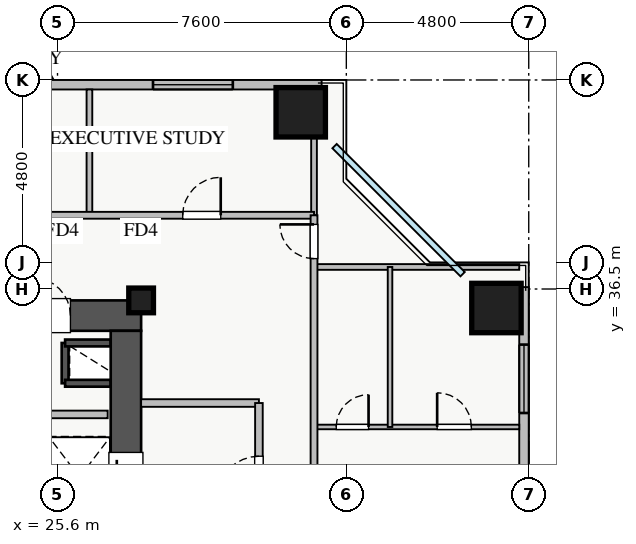
"""IFC4 building model, lengths in metres.
Left out: names, types, materials, properties, quantities, classifications, styles, units other than length and angle.
Written with IfcOpenShell. Run it as: python <this file> out.ifc"""

import sys

from ifc_helpers import new_model, si_unit, direction, frame, frame_2d, origin, origin_2d, place, context, subcontext, project, spatial, rectangle, extrude, source, transform, mapped, element, fill, save


model = new_model("IFC4")
c1 = context("Model", 3, precision=1e-05, world=origin(), true_north=direction((0.0, 1.0)))
c2 = subcontext(c1, "Body", "Model", "MODEL_VIEW")
j1 = project(units=[si_unit("LENGTHUNIT", "METRE"), si_unit("PLANEANGLEUNIT", "RADIAN")], contexts=[c1])
p1 = place(None, origin())
s1 = spatial("IfcSite", under=j1, at=p1, CompositionType="ELEMENT")
p2 = place(p1, origin())
s2 = spatial("IfcBuilding", under=s1, at=p2, CompositionType="ELEMENT")
p3 = place(p2, frame((0.0, 0.0, 42.5)))
s3 = spatial("IfcBuildingStorey", under=s2, at=p3, CompositionType="ELEMENT", Elevation=42.5)
p4 = place(p3, frame((25.8, 34.02, 0.0), z_axis=(0.0, 0.0, 1.0), x_axis=(0.0, 1.0, 0.0)))
e1 = element("IfcWall", 1, at=p4, inside=s3, PredefinedType="SHEAR", context=c2, shape_type="SweptSolid", body=[
    extrude(rectangle(XDim=1.06, YDim=0.18, at=frame_2d((0.53, 0.0))), origin(), (0.0, 0.0, 1.0), 3.03),
])
for number, where, z_axis, x_axis in (
    (2, (25.8, 35.08, 0.0), (0.0, 0.0, 1.0), (1.0, 0.0, 0.0)),
    (3, (25.8, 34.02, 0.0), (0.0, 0.0, 1.0), (1.0, 0.0, 0.0)),
):
    element("IfcWall", number, at=place(p3, frame(where, z_axis=z_axis, x_axis=x_axis)), inside=s3, PredefinedType="SHEAR", context=c2, shape_type="SweptSolid", body=[
        extrude(rectangle(XDim=1.2, YDim=0.18, at=frame_2d((0.6, 0.0))), origin(), (0.0, 0.0, 1.0), 3.03),
    ])
p5 = place(p3, frame((10.2, 35.8, 0.0), z_axis=(0.0, 0.0, 1.0), x_axis=(1.0, 0.0, 0.0)))
e4 = element("IfcWall", 4, at=p5, inside=s3, PredefinedType="SHEAR", context=c2, shape_type="SweptSolid", body=[
    extrude(rectangle(XDim=17.6, YDim=0.8, at=frame_2d((8.8, 0.0))), origin(), (0.0, 0.0, 1.0), 3.25),
])
p6 = place(p5, frame((1.15, 0.0, 0.0)))
e5 = element("IfcOpeningElement", 5, at=p6, cuts=e4, PredefinedType="OPENING", context=c2, shape_type="SweptSolid", body=[
    extrude(rectangle(XDim=1.1, YDim=2.05, at=frame_2d((0.55, 1.025))), frame((0.0, 0.41, 0.0), z_axis=(0.0, -1.0, 0.0), x_axis=(1.0, 0.0, 0.0)), (0.0, 0.0, 1.0), 0.82),
])
p7 = place(p5, frame((8.3, 0.0, 0.0)))
e6 = element("IfcOpeningElement", 6, at=p7, cuts=e4, PredefinedType="OPENING", context=c2, shape_type="SweptSolid", body=[
    extrude(rectangle(XDim=1.1, YDim=2.05, at=frame_2d((0.55, 1.025))), frame((0.0, 0.41, 0.0), z_axis=(0.0, -1.0, 0.0), x_axis=(1.0, 0.0, 0.0)), (0.0, 0.0, 1.0), 0.82),
])
p8 = place(p5, frame((10.05, 0.0, 0.0)))
e7 = element("IfcOpeningElement", 7, at=p8, cuts=e4, PredefinedType="OPENING", context=c2, shape_type="SweptSolid", body=[
    extrude(rectangle(XDim=1.1, YDim=2.05, at=frame_2d((0.55, 1.025))), frame((0.0, 0.41, 0.0), z_axis=(0.0, -1.0, 0.0), x_axis=(1.0, 0.0, 0.0)), (0.0, 0.0, 1.0), 0.82),
])
p9 = place(p5, frame((14.74, 0.0, 0.0)))
e8 = element("IfcOpeningElement", 8, at=p9, cuts=e4, PredefinedType="OPENING", context=c2, shape_type="SweptSolid", body=[
    extrude(rectangle(XDim=1.0, YDim=2.05, at=frame_2d((0.5, 1.025))), frame((0.0, 0.41, 0.0), z_axis=(0.0, -1.0, 0.0), x_axis=(1.0, 0.0, 0.0)), (0.0, 0.0, 1.0), 0.82),
])
p10 = place(p5, frame((11.95, 0.0, 0.0)))
e9 = element("IfcOpeningElement", 9, at=p10, cuts=e4, PredefinedType="OPENING", context=c2, shape_type="SweptSolid", body=[
    extrude(rectangle(XDim=1.0, YDim=2.05, at=frame_2d((0.5, 1.025))), frame((0.0, 0.41, 0.0), z_axis=(0.0, -1.0, 0.0), x_axis=(1.0, 0.0, 0.0)), (0.0, 0.0, 1.0), 0.82),
])
p11 = place(p5, frame((13.485, 0.0, 0.0)))
e10 = element("IfcOpeningElement", 10, at=p11, cuts=e4, PredefinedType="OPENING", context=c2, shape_type="SweptSolid", body=[
    extrude(rectangle(XDim=1.0, YDim=2.05, at=frame_2d((0.5, 1.025))), frame((0.0, 0.41, 0.0), z_axis=(0.0, -1.0, 0.0), x_axis=(1.0, 0.0, 0.0)), (0.0, 0.0, 1.0), 0.82),
])
p12 = place(p3, frame((27.4, 29.8, 0.0), z_axis=(0.0, 0.0, 1.0), x_axis=(0.0, 1.0, 0.0)))
e11 = element("IfcWall", 11, at=p12, inside=s3, PredefinedType="SHEAR", context=c2, shape_type="SweptSolid", body=[
    extrude(rectangle(XDim=5.6, YDim=0.8, at=frame_2d((2.8, 0.0))), origin(), (0.0, 0.0, 1.0), 3.25),
])
p13 = place(p12, frame((1.1, 0.0, 0.0)))
e12 = element("IfcOpeningElement", 12, at=p13, cuts=e11, PredefinedType="OPENING", context=c2, shape_type="SweptSolid", body=[
    extrude(rectangle(XDim=1.3, YDim=2.05, at=frame_2d((0.65, 1.025))), frame((0.0, 0.41, 0.0), z_axis=(0.0, -1.0, 0.0), x_axis=(1.0, 0.0, 0.0)), (0.0, 0.0, 1.0), 0.82),
])
m1 = source(origin(), c2, "Body", "SweptSolid", [
    extrude(rectangle(XDim=0.65, YDim=0.65, at=origin_2d()), origin(), (0.0, 0.0, 1.0), 3.25),
])
p14 = place(p3, frame((27.8, 36.2, 0.0), z_axis=(0.0, 0.0, 1.0), x_axis=(1.0, 0.0, 0.0)))
e13 = element("IfcColumn", 13, at=p14, inside=s3, PredefinedType="PILASTER", context=c2, shape_type="MappedRepresentation", body=[
    mapped(m1, transform((0.0, 0.0, 0.0), x_axis=(1.0, 0.0, 0.0), y_axis=(0.0, 1.0, 0.0), z_axis=(0.0, 0.0, 1.0), scale=1.0)),
])
m2 = source(origin(), c2, "Body", "SweptSolid", [
    extrude(rectangle(XDim=1.3, YDim=1.3, at=origin_2d()), origin(), (0.0, 0.0, 1.0), 3.25),
])
for number, where, z_axis, x_axis in (
    (14, (37.15, 36.0, 0.0), (0.0, 0.0, 1.0), (1.0, 0.0, 0.0)),
    (15, (32.0, 41.15, 0.0), (0.0, 0.0, 1.0), (1.0, 0.0, 0.0)),
):
    element("IfcColumn", number, at=place(p3, frame(where, z_axis=z_axis, x_axis=x_axis)), inside=s3, PredefinedType="COLUMN", context=c2, shape_type="MappedRepresentation", body=[
        mapped(m2, transform((0.0, 0.0, 0.0), x_axis=(1.0, 0.0, 0.0), y_axis=(0.0, 1.0, 0.0), z_axis=(0.0, 0.0, 1.0), scale=1.0)),
    ])
p15 = place(p3, frame((5.45, 41.875, 0.0), z_axis=(0.0, 0.0, 1.0), x_axis=(1.0, 0.0, 0.0)))
e16 = element("IfcWall", 16, at=p15, inside=s3, PredefinedType="STANDARD", context=c2, shape_type="SweptSolid", body=[
    extrude(rectangle(XDim=27.1, YDim=0.25, at=frame_2d((13.55, 0.0))), origin(), (0.0, 0.0, 1.0), 2.57),
])
p16 = place(p15, frame((14.4, 0.0, 0.0)))
e17 = element("IfcOpeningElement", 17, at=p16, cuts=e16, PredefinedType="OPENING", context=c2, shape_type="SweptSolid", body=[
    extrude(rectangle(XDim=1.2, YDim=2.1, at=frame_2d((0.6, 1.05))), frame((0.0, 0.135, 0.0), z_axis=(0.0, -1.0, 0.0), x_axis=(1.0, 0.0, 0.0)), (0.0, 0.0, 1.0), 0.27),
])
p17 = place(p15, frame((1.45, 0.0, 0.9)))
e18 = element("IfcOpeningElement", 18, at=p17, cuts=e16, PredefinedType="OPENING", context=c2, shape_type="SweptSolid", body=[
    extrude(rectangle(XDim=1.5, YDim=1.5, at=frame_2d((0.75, 0.75))), frame((0.0, 0.135, 0.0), z_axis=(0.0, -1.0, 0.0), x_axis=(1.0, 0.0, 0.0)), (0.0, 0.0, 1.0), 0.27),
])
p18 = place(p15, frame((7.82, 0.0, 0.9)))
e19 = element("IfcOpeningElement", 19, at=p18, cuts=e16, PredefinedType="OPENING", context=c2, shape_type="SweptSolid", body=[
    extrude(rectangle(XDim=1.8, YDim=1.5, at=frame_2d((0.9, 0.75))), frame((0.0, 0.135, 0.0), z_axis=(0.0, -1.0, 0.0), x_axis=(1.0, 0.0, 0.0)), (0.0, 0.0, 1.0), 0.27),
])
p19 = place(p15, frame((17.92, 0.0, 0.9)))
e20 = element("IfcOpeningElement", 20, at=p19, cuts=e16, PredefinedType="OPENING", context=c2, shape_type="SweptSolid", body=[
    extrude(rectangle(XDim=1.5, YDim=1.5, at=frame_2d((0.75, 0.75))), frame((0.0, 0.135, 0.0), z_axis=(0.0, -1.0, 0.0), x_axis=(1.0, 0.0, 0.0)), (0.0, 0.0, 1.0), 0.27),
])
p20 = place(p15, frame((22.663, 0.0, 0.9)))
e21 = element("IfcOpeningElement", 21, at=p20, cuts=e16, PredefinedType="OPENING", context=c2, shape_type="SweptSolid", body=[
    extrude(rectangle(XDim=2.1, YDim=1.48, at=frame_2d((1.05, 0.74))), frame((0.0, 0.135, 0.0), z_axis=(0.0, -1.0, 0.0), x_axis=(1.0, 0.0, 0.0)), (0.0, 0.0, 1.0), 0.27),
])
p21 = place(p15, frame((5.084, 0.0, 0.9)))
e22 = element("IfcOpeningElement", 22, at=p21, cuts=e16, PredefinedType="OPENING", context=c2, shape_type="SweptSolid", body=[
    extrude(rectangle(XDim=2.4, YDim=1.5, at=frame_2d((1.2, 0.75))), frame((0.0, 0.135, 0.0), z_axis=(0.0, -1.0, 0.0), x_axis=(1.0, 0.0, 0.0)), (0.0, 0.0, 1.0), 0.27),
])
p22 = place(p15, frame((11.002, 0.0, 0.9)))
e23 = element("IfcOpeningElement", 23, at=p22, cuts=e16, PredefinedType="OPENING", context=c2, shape_type="SweptSolid", body=[
    extrude(rectangle(XDim=2.4, YDim=1.5, at=frame_2d((1.2, 0.75))), frame((0.0, 0.135, 0.0), z_axis=(0.0, -1.0, 0.0), x_axis=(1.0, 0.0, 0.0)), (0.0, 0.0, 1.0), 0.27),
])
p23 = place(p3, frame((37.875, 9.45, 0.0), z_axis=(0.0, 0.0, 1.0), x_axis=(0.0, 1.0, 0.0)))
e24 = element("IfcWall", 24, at=p23, inside=s3, PredefinedType="STANDARD", context=c2, shape_type="SweptSolid", body=[
    extrude(rectangle(XDim=27.1, YDim=0.25, at=frame_2d((13.55, 0.0))), origin(), (0.0, 0.0, 1.0), 2.57),
])
p24 = place(p23, frame((14.4, 0.0, 0.0)))
e25 = element("IfcOpeningElement", 25, at=p24, cuts=e24, PredefinedType="OPENING", context=c2, shape_type="SweptSolid", body=[
    extrude(rectangle(XDim=1.2, YDim=2.1, at=frame_2d((0.6, 1.05))), frame((0.0, 0.135, 0.0), z_axis=(0.0, -1.0, 0.0), x_axis=(1.0, 0.0, 0.0)), (0.0, 0.0, 1.0), 0.27),
])
p25 = place(p23, frame((2.188, 0.0, 0.9)))
e26 = element("IfcOpeningElement", 26, at=p25, cuts=e24, PredefinedType="OPENING", context=c2, shape_type="SweptSolid", body=[
    extrude(rectangle(XDim=2.4, YDim=1.48, at=frame_2d((1.2, 0.74))), frame((0.0, 0.135, 0.0), z_axis=(0.0, -1.0, 0.0), x_axis=(1.0, 0.0, 0.0)), (0.0, 0.0, 1.0), 0.27),
])
p26 = place(p23, frame((23.788, 0.0, 0.9)))
e27 = element("IfcOpeningElement", 27, at=p26, cuts=e24, PredefinedType="OPENING", context=c2, shape_type="SweptSolid", body=[
    extrude(rectangle(XDim=1.8, YDim=1.5, at=frame_2d((0.9, 0.75))), frame((0.0, 0.135, 0.0), z_axis=(0.0, -1.0, 0.0), x_axis=(1.0, 0.0, 0.0)), (0.0, 0.0, 1.0), 0.27),
])
p27 = place(p23, frame((19.758, 0.0, 0.9)))
e28 = element("IfcOpeningElement", 28, at=p27, cuts=e24, PredefinedType="OPENING", context=c2, shape_type="SweptSolid", body=[
    extrude(rectangle(XDim=2.4, YDim=1.5, at=frame_2d((1.2, 0.75))), frame((0.0, 0.135, 0.0), z_axis=(0.0, -1.0, 0.0), x_axis=(1.0, 0.0, 0.0)), (0.0, 0.0, 1.0), 0.27),
])
p28 = place(p23, frame((11.365, 0.0, 0.9)))
e29 = element("IfcOpeningElement", 29, at=p28, cuts=e24, PredefinedType="OPENING", context=c2, shape_type="SweptSolid", body=[
    extrude(rectangle(XDim=0.9, YDim=1.2, at=frame_2d((0.45, 0.6))), frame((0.0, 0.135, 0.0), z_axis=(0.0, -1.0, 0.0), x_axis=(1.0, 0.0, 0.0)), (0.0, 0.0, 1.0), 0.27),
])
p29 = place(p3, frame((27.8, 33.5, 0.0), z_axis=(0.0, 0.0, 1.0), x_axis=(1.0, 0.0, 0.0)))
e30 = element("IfcWall", 30, at=p29, inside=s3, PredefinedType="PARTITIONING", context=c2, shape_type="SweptSolid", body=[
    extrude(rectangle(XDim=3.1, YDim=0.2, at=frame_2d((1.55, 0.0))), origin(), (0.0, 0.0, 1.0), 3.03),
])
p30 = place(p3, frame((30.9, 29.6, 0.0), z_axis=(0.0, 0.0, 1.0), x_axis=(0.0, 1.0, 0.0)))
e31 = element("IfcWall", 31, at=p30, inside=s3, PredefinedType="PARTITIONING", context=c2, shape_type="SweptSolid", body=[
    extrude(rectangle(XDim=3.9, YDim=0.2, at=frame_2d((1.95, 0.0))), origin(), (0.0, 0.0, 1.0), 3.03),
])
p31 = place(p30, frame((1.4, 0.0, 0.0)))
e32 = element("IfcOpeningElement", 32, at=p31, cuts=e31, PredefinedType="OPENING", context=c2, shape_type="SweptSolid", body=[
    extrude(rectangle(XDim=1.1, YDim=2.05, at=frame_2d((0.55, 1.025))), frame((0.0, 0.11, 0.0), z_axis=(0.0, -1.0, 0.0), x_axis=(1.0, 0.0, 0.0)), (0.0, 0.0, 1.0), 0.22),
])
p32 = place(p3, frame((21.75, 33.2, 0.0), z_axis=(0.0, 0.0, 1.0), x_axis=(1.0, 0.0, 0.0)))
e33 = element("IfcWall", 33, at=p32, inside=s3, PredefinedType="PARTITIONING", context=c2, shape_type="SweptSolid", body=[
    extrude(rectangle(XDim=5.17, YDim=0.2, at=frame_2d((2.585, 0.0))), origin(), (0.0, 0.0, 1.0), 3.03),
])
for number, where, z_axis, x_axis in (
    (34, (26.44, 38.44, 0.0), (0.0, 0.0, 1.0), (0.0, 1.0, 0.0)),
    (35, (32.35, 38.44, 0.0), (0.0, 0.0, 1.0), (0.0, 1.0, 0.0)),
):
    element("IfcWall", number, at=place(p3, frame(where, z_axis=z_axis, x_axis=x_axis)), inside=s3, PredefinedType="PARTITIONING", context=c2, shape_type="SweptSolid", body=[
        extrude(rectangle(XDim=3.31, YDim=0.15, at=frame_2d((1.655, 0.0))), origin(), (0.0, 0.0, 1.0), 3.03),
    ])
p33 = place(p3, frame((8.72, 38.44, 0.0), z_axis=(0.0, 0.0, 1.0), x_axis=(1.0, 0.0, 0.0)))
e36 = element("IfcWall", 36, at=p33, inside=s3, PredefinedType="PARTITIONING", context=c2, shape_type="SweptSolid", body=[
    extrude(rectangle(XDim=23.63, YDim=0.18, at=frame_2d((11.815, 0.0))), origin(), (0.0, 0.0, 1.0), 3.03),
])
p34 = place(p33, frame((2.86, 0.0, 0.0)))
e37 = element("IfcOpeningElement", 37, at=p34, cuts=e36, PredefinedType="OPENING", context=c2, shape_type="SweptSolid", body=[
    extrude(rectangle(XDim=1.0, YDim=2.05, at=frame_2d((0.5, 1.025))), frame((0.0, 0.1, 0.0), z_axis=(0.0, -1.0, 0.0), x_axis=(1.0, 0.0, 0.0)), (0.0, 0.0, 1.0), 0.2),
])
p35 = place(p33, frame((9.4, 0.0, 0.0)))
e38 = element("IfcOpeningElement", 38, at=p35, cuts=e36, PredefinedType="OPENING", context=c2, shape_type="SweptSolid", body=[
    extrude(rectangle(XDim=1.0, YDim=2.05, at=frame_2d((0.5, 1.025))), frame((0.0, 0.1, 0.0), z_axis=(0.0, -1.0, 0.0), x_axis=(1.0, 0.0, 0.0)), (0.0, 0.0, 1.0), 0.2),
])
p36 = place(p33, frame((14.9, 0.0, 0.0)))
e39 = element("IfcOpeningElement", 39, at=p36, cuts=e36, PredefinedType="OPENING", context=c2, shape_type="SweptSolid", body=[
    extrude(rectangle(XDim=1.0, YDim=2.05, at=frame_2d((0.5, 1.025))), frame((0.0, 0.1, 0.0), z_axis=(0.0, -1.0, 0.0), x_axis=(1.0, 0.0, 0.0)), (0.0, 0.0, 1.0), 0.2),
])
p37 = place(p33, frame((20.175, 0.0, 0.0)))
e40 = element("IfcOpeningElement", 40, at=p37, cuts=e36, PredefinedType="OPENING", context=c2, shape_type="SweptSolid", body=[
    extrude(rectangle(XDim=1.0, YDim=2.05, at=frame_2d((0.5, 1.025))), frame((0.0, 0.1, 0.0), z_axis=(0.0, -1.0, 0.0), x_axis=(1.0, 0.0, 0.0)), (0.0, 0.0, 1.0), 0.2),
])
p38 = place(p3, frame((32.35, 37.08, 0.0), z_axis=(0.0, 0.0, 1.0), x_axis=(1.0, 0.0, 0.0)))
e41 = element("IfcWall", 41, at=p38, inside=s3, PredefinedType="PARTITIONING", context=c2, shape_type="SweptSolid", body=[
    extrude(rectangle(XDim=5.4, YDim=0.15, at=frame_2d((2.7, 0.0))), origin(), (0.0, 0.0, 1.0), 3.03),
])
p39 = place(p3, frame((32.35, 32.87, 0.0), z_axis=(0.0, 0.0, 1.0), x_axis=(1.0, 0.0, 0.0)))
e42 = element("IfcWall", 42, at=p39, inside=s3, PredefinedType="PLUMBINGWALL", context=c2, shape_type="SweptSolid", body=[
    extrude(rectangle(XDim=5.4, YDim=0.12, at=frame_2d((2.7, 0.0))), origin(), (0.0, 0.0, 1.0), 3.03),
])
p40 = place(p39, frame((0.585, 0.0, 0.0)))
e43 = element("IfcOpeningElement", 43, at=p40, cuts=e42, PredefinedType="OPENING", context=c2, shape_type="SweptSolid", body=[
    extrude(rectangle(XDim=0.85, YDim=2.05, at=frame_2d((0.425, 1.025))), frame((0.0, 0.07, 0.0), z_axis=(0.0, -1.0, 0.0), x_axis=(1.0, 0.0, 0.0)), (0.0, 0.0, 1.0), 0.14),
])
p41 = place(p39, frame((3.24, 0.0, 0.0)))
e44 = element("IfcOpeningElement", 44, at=p41, cuts=e42, PredefinedType="OPENING", context=c2, shape_type="SweptSolid", body=[
    extrude(rectangle(XDim=0.9, YDim=2.05, at=frame_2d((0.45, 1.025))), frame((0.0, 0.07, 0.0), z_axis=(0.0, -1.0, 0.0), x_axis=(1.0, 0.0, 0.0)), (0.0, 0.0, 1.0), 0.14),
])
p42 = place(p3, frame((34.35, 32.87, 0.0), z_axis=(0.0, 0.0, 1.0), x_axis=(0.0, 1.0, 0.0)))
e45 = element("IfcWall", 45, at=p42, inside=s3, PredefinedType="PLUMBINGWALL", context=c2, shape_type="SweptSolid", body=[
    extrude(rectangle(XDim=4.21, YDim=0.12, at=frame_2d((2.105, 0.0))), origin(), (0.0, 0.0, 1.0), 3.03),
])
p43 = place(p3, frame((32.35, 7.21, 0.0), z_axis=(0.0, 0.0, 1.0), x_axis=(0.0, 1.0, 0.0)))
e46 = element("IfcWall", 46, at=p43, inside=s3, PredefinedType="PARTITIONING", context=c2, shape_type="SweptSolid", body=[
    extrude(rectangle(XDim=31.23, YDim=0.18, at=frame_2d((15.615, 0.0))), origin(), (0.0, 0.0, 1.0), 2.825),
])
p44 = place(p43, frame((30.09, 0.0, 0.0)))
e47 = element("IfcOpeningElement", 47, at=p44, cuts=e46, PredefinedType="OPENING", context=c2, shape_type="SweptSolid", body=[
    extrude(rectangle(XDim=0.9, YDim=2.05, at=frame_2d((0.45, 1.025))), frame((0.0, 0.1, 0.0), z_axis=(0.0, -1.0, 0.0), x_axis=(1.0, 0.0, 0.0)), (0.0, 0.0, 1.0), 0.2),
])
p45 = place(p43, frame((0.415, 0.0, 0.0)))
e48 = element("IfcOpeningElement", 48, at=p45, cuts=e46, PredefinedType="OPENING", context=c2, shape_type="SweptSolid", body=[
    extrude(rectangle(XDim=0.9, YDim=2.05, at=frame_2d((0.45, 1.025))), frame((0.0, 0.1, 0.0), z_axis=(0.0, -1.0, 0.0), x_axis=(1.0, 0.0, 0.0)), (0.0, 0.0, 1.0), 0.2),
])
p46 = place(p43, frame((6.305, 0.0, 0.0)))
e49 = element("IfcOpeningElement", 49, at=p46, cuts=e46, PredefinedType="OPENING", context=c2, shape_type="SweptSolid", body=[
    extrude(rectangle(XDim=1.0, YDim=2.05, at=frame_2d((0.5, 1.025))), frame((0.0, 0.1, 0.0), z_axis=(0.0, -1.0, 0.0), x_axis=(1.0, 0.0, 0.0)), (0.0, 0.0, 1.0), 0.2),
])
p47 = place(p43, frame((13.205, 0.0, 0.0)))
e50 = element("IfcOpeningElement", 50, at=p47, cuts=e46, PredefinedType="OPENING", context=c2, shape_type="SweptSolid", body=[
    extrude(rectangle(XDim=1.0, YDim=2.05, at=frame_2d((0.5, 1.025))), frame((0.0, 0.1, 0.0), z_axis=(0.0, -1.0, 0.0), x_axis=(1.0, 0.0, 0.0)), (0.0, 0.0, 1.0), 0.2),
])
p48 = place(p43, frame((22.5, 0.0, 0.0)))
e51 = element("IfcOpeningElement", 51, at=p48, cuts=e46, PredefinedType="OPENING", context=c2, shape_type="SweptSolid", body=[
    extrude(rectangle(XDim=1.0, YDim=2.05, at=frame_2d((0.5, 1.025))), frame((0.0, 0.1, 0.0), z_axis=(0.0, -1.0, 0.0), x_axis=(1.0, 0.0, 0.0)), (0.0, 0.0, 1.0), 0.2),
])
m3 = source(origin(), c2, "Body", "SweptSolid", [
    extrude(rectangle(XDim=2.1, YDim=1.48, at=frame_2d((1.05, 0.74))), frame((0.0, 0.03, 0.0), z_axis=(0.0, -1.0, 0.0), x_axis=(1.0, 0.0, 0.0)), (0.0, 0.0, 1.0), 0.06),
])
p49 = place(p20, origin())
e52 = element("IfcWindow", 52, at=p49, inside=s3, PartitioningType="TRIPLE_PANEL_VERTICAL", PredefinedType="WINDOW", context=c2, shape_type="MappedRepresentation", body=[
    mapped(m3, transform((0.0, 0.0, 0.0), x_axis=(1.0, 0.0, 0.0), y_axis=(0.0, 1.0, 0.0), z_axis=(0.0, 0.0, 1.0), scale=1.0)),
])
fill(e21, e52)
m4 = source(origin(), c2, "Body", "SweptSolid", [
    extrude(rectangle(XDim=1.8, YDim=1.5, at=frame_2d((0.9, 0.75))), frame((0.0, 0.03, 0.0), z_axis=(0.0, -1.0, 0.0), x_axis=(1.0, 0.0, 0.0)), (0.0, 0.0, 1.0), 0.06),
])
p50 = place(p26, origin())
e53 = element("IfcWindow", 53, at=p50, inside=s3, PartitioningType="TRIPLE_PANEL_VERTICAL", PredefinedType="WINDOW", context=c2, shape_type="MappedRepresentation", body=[
    mapped(m4, transform((0.0, 0.0, 0.0), x_axis=(1.0, 0.0, 0.0), y_axis=(0.0, 1.0, 0.0), z_axis=(0.0, 0.0, 1.0), scale=1.0)),
])
fill(e27, e53)
m5 = source(origin(), c2, "Body", "SweptSolid", [
    extrude(rectangle(XDim=1.3, YDim=2.05, at=frame_2d((0.65, 1.025))), frame((0.0, 0.025, 0.0), z_axis=(0.0, -1.0, 0.0), x_axis=(1.0, 0.0, 0.0)), (0.0, 0.0, 1.0), 0.05),
])
p51 = place(p13, origin())
e54 = element("IfcDoor", 54, at=p51, inside=s3, OperationType="SLIDING_TO_LEFT", PredefinedType="DOOR", context=c2, shape_type="MappedRepresentation", body=[
    mapped(m5, transform((0.0, 0.0, 0.0), x_axis=(1.0, 0.0, 0.0), y_axis=(0.0, 1.0, 0.0), z_axis=(0.0, 0.0, 1.0), scale=1.0)),
])
fill(e12, e54)
m6 = source(origin(), c2, "Body", "SweptSolid", [
    extrude(rectangle(XDim=1.0, YDim=2.05, at=frame_2d((0.5, 1.025))), frame((0.0, 0.025, 0.0), z_axis=(0.0, -1.0, 0.0), x_axis=(1.0, 0.0, 0.0)), (0.0, 0.0, 1.0), 0.05),
])
p52 = place(p9, origin())
e55 = element("IfcDoor", 55, at=p52, inside=s3, OperationType="SINGLE_SWING_LEFT", PredefinedType="DOOR", context=c2, shape_type="MappedRepresentation", body=[
    mapped(m6, transform((0.0, 0.0, 0.0), x_axis=(1.0, 0.0, 0.0), y_axis=(0.0, 1.0, 0.0), z_axis=(0.0, 0.0, 1.0), scale=1.0)),
])
fill(e8, e55)
m7 = source(origin(), c2, "Body", "SweptSolid", [
    extrude(rectangle(XDim=1.1, YDim=2.05, at=frame_2d((0.55, 1.025))), frame((0.0, 0.025, 0.0), z_axis=(0.0, -1.0, 0.0), x_axis=(1.0, 0.0, 0.0)), (0.0, 0.0, 1.0), 0.05),
])
p53 = place(p31, origin())
e56 = element("IfcDoor", 56, at=p53, inside=s3, OperationType="SINGLE_SWING_LEFT", PredefinedType="DOOR", context=c2, shape_type="MappedRepresentation", body=[
    mapped(m7, transform((0.0, 0.0, 0.0), x_axis=(1.0, 0.0, 0.0), y_axis=(0.0, 1.0, 0.0), z_axis=(0.0, 0.0, 1.0), scale=1.0)),
])
fill(e32, e56)
p54 = place(p37, origin())
e57 = element("IfcDoor", 57, at=p54, inside=s3, OperationType="SINGLE_SWING_RIGHT", PredefinedType="DOOR", context=c2, shape_type="MappedRepresentation", body=[
    mapped(m6, transform((0.0, 0.0, 0.0), x_axis=(1.0, 0.0, 0.0), y_axis=(0.0, 1.0, 0.0), z_axis=(0.0, 0.0, 1.0), scale=1.0)),
])
fill(e40, e57)
m8 = source(origin(), c2, "Body", "SweptSolid", [
    extrude(rectangle(XDim=0.85, YDim=2.05, at=frame_2d((0.425, 1.025))), frame((0.0, 0.025, 0.0), z_axis=(0.0, -1.0, 0.0), x_axis=(1.0, 0.0, 0.0)), (0.0, 0.0, 1.0), 0.05),
])
p55 = place(p40, origin())
e58 = element("IfcDoor", 58, at=p55, inside=s3, OperationType="SINGLE_SWING_RIGHT", PredefinedType="DOOR", context=c2, shape_type="MappedRepresentation", body=[
    mapped(m8, transform((0.0, 0.0, 0.0), x_axis=(1.0, 0.0, 0.0), y_axis=(0.0, 1.0, 0.0), z_axis=(0.0, 0.0, 1.0), scale=1.0)),
])
fill(e43, e58)
m9 = source(origin(), c2, "Body", "SweptSolid", [
    extrude(rectangle(XDim=0.9, YDim=2.05, at=frame_2d((0.45, 1.025))), frame((0.0, 0.025, 0.0), z_axis=(0.0, -1.0, 0.0), x_axis=(1.0, 0.0, 0.0)), (0.0, 0.0, 1.0), 0.05),
])
p56 = place(p41, origin())
e59 = element("IfcDoor", 59, at=p56, inside=s3, OperationType="SINGLE_SWING_LEFT", PredefinedType="DOOR", context=c2, shape_type="MappedRepresentation", body=[
    mapped(m9, transform((0.0, 0.0, 0.0), x_axis=(1.0, 0.0, 0.0), y_axis=(0.0, 1.0, 0.0), z_axis=(0.0, 0.0, 1.0), scale=1.0)),
])
fill(e44, e59)
p57 = place(p44, origin())
e60 = element("IfcDoor", 60, at=p57, inside=s3, OperationType="SINGLE_SWING_RIGHT", PredefinedType="DOOR", context=c2, shape_type="MappedRepresentation", body=[
    mapped(m9, transform((0.0, 0.0, 0.0), x_axis=(1.0, 0.0, 0.0), y_axis=(0.0, 1.0, 0.0), z_axis=(0.0, 0.0, 1.0), scale=1.0)),
])
fill(e47, e60)
save(model, sys.argv[1])
